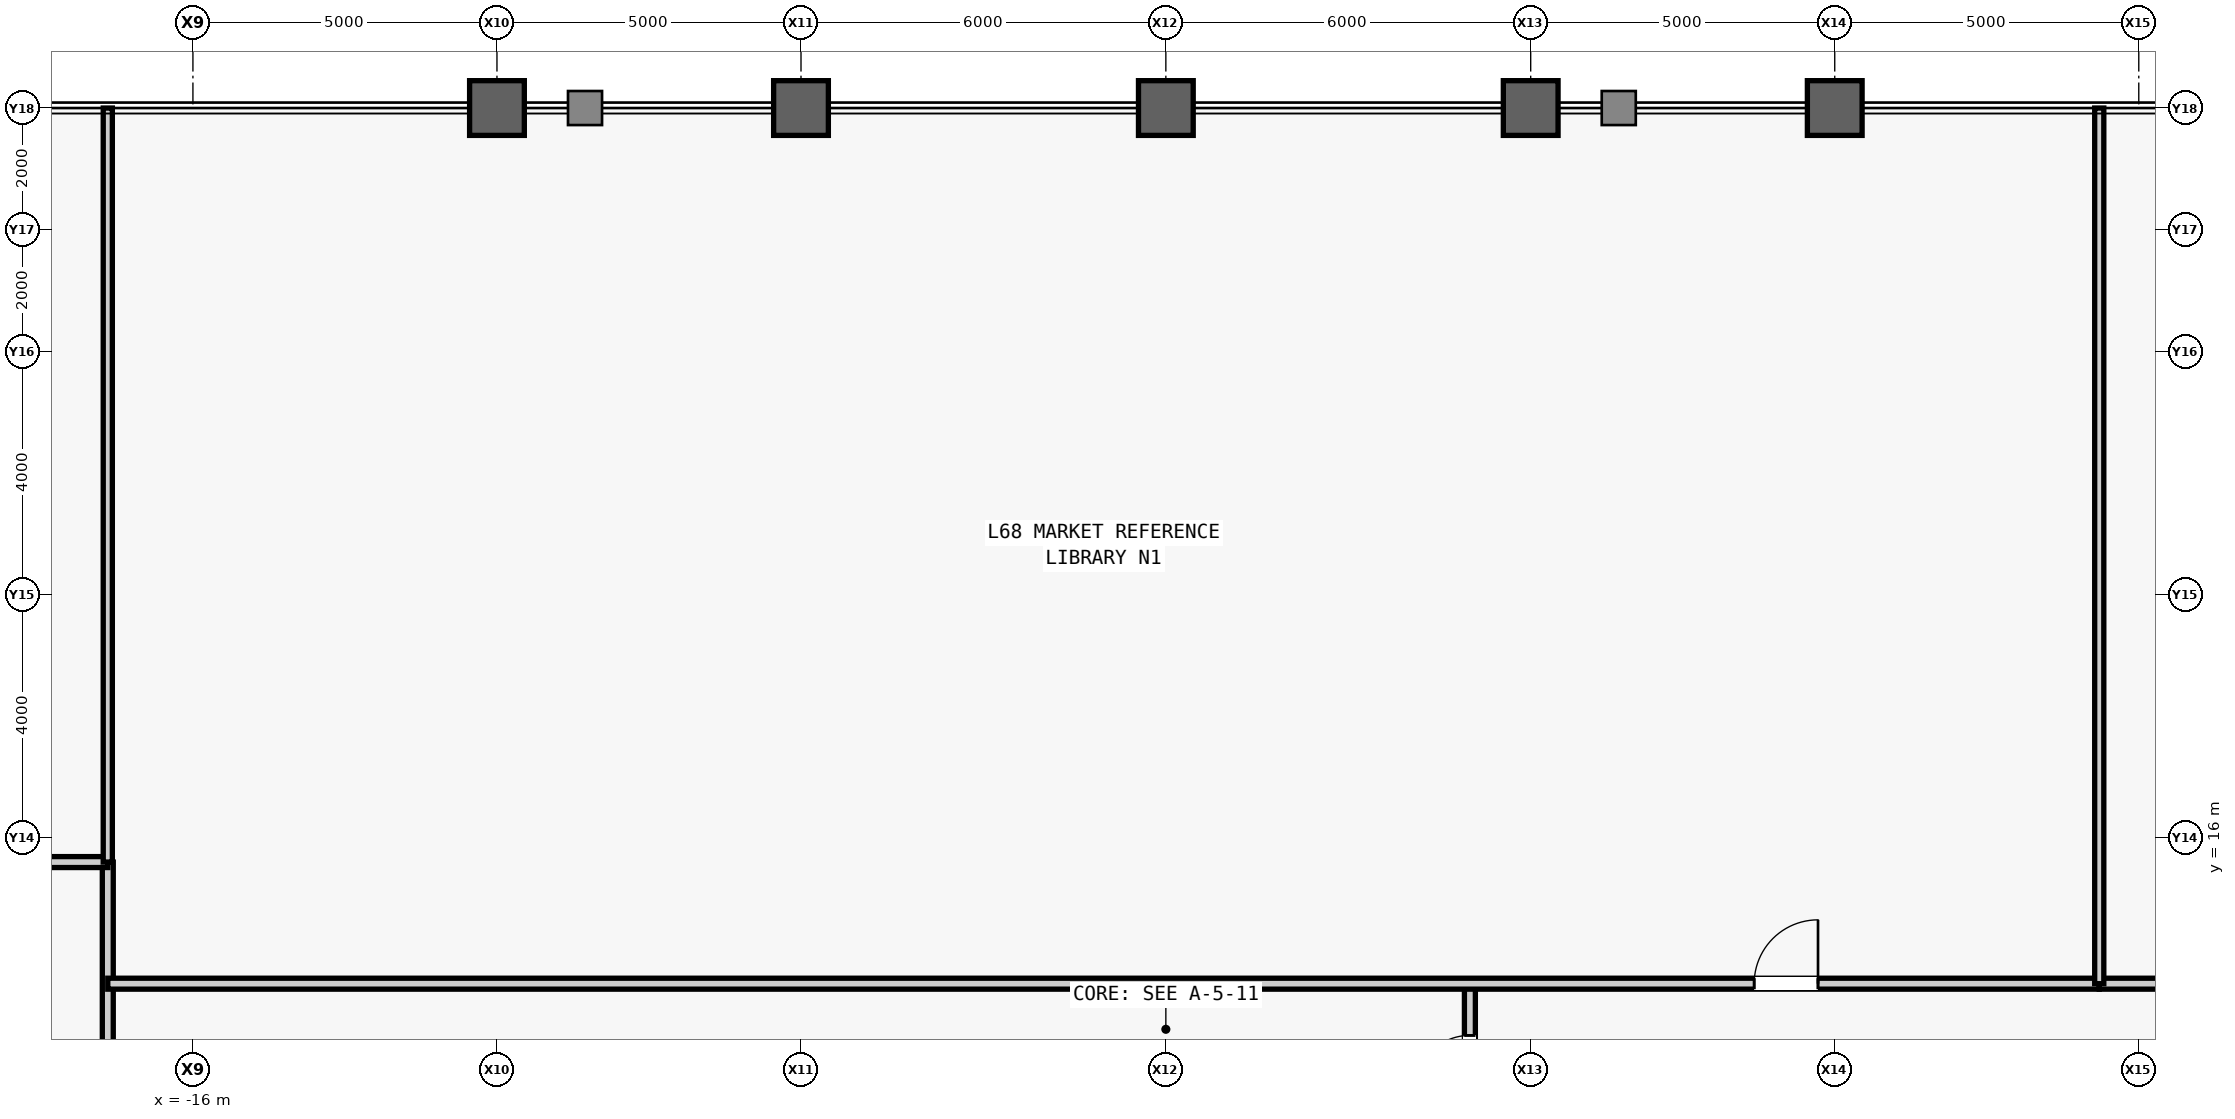
"""IFC4 building model, lengths in metres.
Left out: names, types, materials, properties, quantities, classifications, styles, units other than length and angle.
Written with IfcOpenShell. Run it as: python <this file> out.ifc"""

import sys

from ifc_helpers import new_model, si_unit, direction, frame, frame_2d, origin, origin_2d, place, context, subcontext, project, spatial, rectangle, hollow_rectangle, extrude, source, transform, mapped, element, fill, save


model = new_model("IFC4")
c1 = context("Model", 3, precision=1e-05, world=origin(), true_north=direction((0.0, 1.0)))
c2 = subcontext(c1, "Body", "Model", "MODEL_VIEW")
j1 = project(units=[si_unit("LENGTHUNIT", "METRE"), si_unit("PLANEANGLEUNIT", "RADIAN")], contexts=[c1])
p1 = place(None, origin())
s1 = spatial("IfcSite", under=j1, at=p1, CompositionType="ELEMENT")
p2 = place(p1, origin())
s2 = spatial("IfcBuilding", under=s1, at=p2, CompositionType="ELEMENT")
p3 = place(p2, frame((0.0, 0.0, 289.5)))
s3 = spatial("IfcBuildingStorey", under=s2, at=p3, CompositionType="ELEMENT", Elevation=289.5)
m1 = source(origin(), c2, "Body", "SweptSolid", [
    extrude(hollow_rectangle(XDim=0.9, YDim=0.9, WallThickness=0.05, at=origin_2d()), origin(), (0.0, 0.0, 1.0), 4.0),
])
for number, where, z_axis, x_axis in (
    (1, (-11.0, 28.0, 0.0), (0.0, 0.0, 1.0), (1.0, 0.0, 0.0)),
    (2, (-6.0, 28.0, 0.0), (0.0, 0.0, 1.0), (1.0, 0.0, 0.0)),
    (3, (0.0, 28.0, 0.0), (0.0, 0.0, 1.0), (1.0, 0.0, 0.0)),
    (4, (6.0, 28.0, 0.0), (0.0, 0.0, 1.0), (1.0, 0.0, 0.0)),
    (5, (11.0, 28.0, 0.0), (0.0, 0.0, 1.0), (1.0, 0.0, 0.0)),
):
    element("IfcColumn", number, at=place(p3, frame(where, z_axis=z_axis, x_axis=x_axis)), inside=s3, PredefinedType="COLUMN", context=c2, shape_type="MappedRepresentation", body=[
        mapped(m1, transform((0.0, 0.0, 0.0), scale=1.0)),
    ])
m2 = source(origin(), c2, "Body", "SweptSolid", [
    extrude(rectangle(XDim=8.4, YDim=0.18, at=frame_2d((4.2, 0.0))), origin(), (0.0, 0.0, 1.0), 3.78),
])
p4 = place(p3, frame((-17.4, 7.2, 0.0), z_axis=(0.0, 0.0, 1.0), x_axis=(0.0, 1.0, 0.0)))
e6 = element("IfcWall", 6, at=p4, inside=s3, PredefinedType="PARTITIONING", context=c2, shape_type="MappedRepresentation", body=[
    mapped(m2, transform((0.0, 0.0, 0.0), scale=1.0)),
])
m3 = source(origin(), c2, "Body", "SweptSolid", [
    extrude(rectangle(XDim=2.6, YDim=0.18, at=frame_2d((1.3, 0.0))), origin(), (0.0, 0.0, 1.0), 3.78),
])
p5 = place(p3, frame((5.0, 11.0, 0.0), z_axis=(0.0, 0.0, 1.0), x_axis=(0.0, 1.0, 0.0)))
e7 = element("IfcWall", 7, at=p5, inside=s3, PredefinedType="PARTITIONING", context=c2, shape_type="MappedRepresentation", body=[
    mapped(m3, transform((0.0, 0.0, 0.0), scale=1.0)),
])
m4 = source(origin(), c2, "Body", "SweptSolid", [
    extrude(rectangle(XDim=0.9, YDim=2.15, at=frame_2d((0.45, 1.075))), frame((0.0, 0.1, 0.0), z_axis=(0.0, -1.0, 0.0), x_axis=(1.0, 0.0, 0.0)), (0.0, 0.0, 1.0), 0.2),
])
p6 = place(p5, frame((0.85, 0.0, 0.0)))
e8 = element("IfcOpeningElement", 8, at=p6, cuts=e7, PredefinedType="OPENING", context=c2, shape_type="MappedRepresentation", body=[
    mapped(m4, transform((0.0, 0.0, 0.0), scale=1.0)),
])
m5 = source(origin(), c2, "Body", "SweptSolid", [
    extrude(rectangle(XDim=2.4, YDim=0.18, at=frame_2d((1.2, 0.0))), origin(), (0.0, 0.0, 1.0), 3.78),
])
p7 = place(p3, frame((-19.8, 15.6, 0.0), z_axis=(0.0, 0.0, 1.0), x_axis=(1.0, 0.0, 0.0)))
e9 = element("IfcWall", 9, at=p7, inside=s3, PredefinedType="PARTITIONING", context=c2, shape_type="MappedRepresentation", body=[
    mapped(m5, transform((0.0, 0.0, 0.0), scale=1.0)),
])
m6 = source(origin(), c2, "Body", "SweptSolid", [
    extrude(rectangle(XDim=2.4, YDim=0.18, at=frame_2d((1.2, 0.0))), origin(), (0.0, 0.0, 1.0), 3.78),
])
p8 = place(p3, frame((15.35, 13.6, 0.0), z_axis=(0.0, 0.0, 1.0), x_axis=(1.0, 0.0, 0.0)))
e10 = element("IfcWall", 10, at=p8, inside=s3, PredefinedType="PARTITIONING", context=c2, shape_type="MappedRepresentation", body=[
    mapped(m6, transform((0.0, 0.0, 0.0), scale=1.0)),
])
m7 = source(origin(), c2, "Body", "SweptSolid", [
    extrude(rectangle(XDim=32.75, YDim=0.18, at=frame_2d((16.375, 0.0))), origin(), (0.0, 0.0, 1.0), 3.78),
])
p9 = place(p3, frame((-17.4, 13.6, 0.0), z_axis=(0.0, 0.0, 1.0), x_axis=(1.0, 0.0, 0.0)))
e11 = element("IfcWall", 11, at=p9, inside=s3, PredefinedType="PARTITIONING", context=c2, shape_type="MappedRepresentation", body=[
    mapped(m7, transform((0.0, 0.0, 0.0), scale=1.0)),
])
m8 = source(origin(), c2, "Body", "SweptSolid", [
    extrude(rectangle(XDim=1.05, YDim=2.2, at=frame_2d((0.525, 1.1))), frame((0.0, 0.1, 0.0), z_axis=(0.0, -1.0, 0.0), x_axis=(1.0, 0.0, 0.0)), (0.0, 0.0, 1.0), 0.2),
])
p10 = place(p9, frame((27.075, 0.0, 0.0)))
e12 = element("IfcOpeningElement", 12, at=p10, cuts=e11, PredefinedType="OPENING", context=c2, shape_type="MappedRepresentation", body=[
    mapped(m8, transform((0.0, 0.0, 0.0), scale=1.0)),
])
m9 = source(origin(), c2, "Body", "SweptSolid", [
    extrude(rectangle(XDim=12.4, YDim=0.15, at=frame_2d((6.2, 0.0))), origin(), (0.0, 0.0, 1.0), 3.78),
])
p11 = place(p3, frame((-17.4, 15.6, 0.0), z_axis=(0.0, 0.0, 1.0), x_axis=(0.0, 1.0, 0.0)))
e13 = element("IfcWall", 13, at=p11, inside=s3, PredefinedType="PARTITIONING", context=c2, shape_type="MappedRepresentation", body=[
    mapped(m9, transform((0.0, 0.0, 0.0), scale=1.0)),
])
m10 = source(origin(), c2, "Body", "SweptSolid", [
    extrude(rectangle(XDim=14.4, YDim=0.15, at=frame_2d((7.2, 0.0))), origin(), (0.0, 0.0, 1.0), 3.78),
])
p12 = place(p3, frame((15.35, 13.6, 0.0), z_axis=(0.0, 0.0, 1.0), x_axis=(0.0, 1.0, 0.0)))
e14 = element("IfcWall", 14, at=p12, inside=s3, PredefinedType="PARTITIONING", context=c2, shape_type="MappedRepresentation", body=[
    mapped(m10, transform((0.0, 0.0, 0.0), scale=1.0)),
])
m11 = source(origin(), c2, "Body", "SweptSolid", [
    extrude(rectangle(XDim=0.9, YDim=2.15, at=frame_2d((0.45, 1.075))), frame((0.0, 0.025, 0.0), z_axis=(0.0, -1.0, 0.0), x_axis=(1.0, 0.0, 0.0)), (0.0, 0.0, 1.0), 0.05),
])
p13 = place(p6, origin())
e15 = element("IfcDoor", 15, at=p13, inside=s3, OperationType="SINGLE_SWING_LEFT", PredefinedType="DOOR", context=c2, shape_type="MappedRepresentation", body=[
    mapped(m11, transform((0.0, 0.0, 0.0), scale=1.0)),
])
fill(e8, e15)
m12 = source(origin(), c2, "Body", "SweptSolid", [
    extrude(rectangle(XDim=1.05, YDim=2.2, at=frame_2d((0.525, 1.1))), frame((0.0, 0.025, 0.0), z_axis=(0.0, -1.0, 0.0), x_axis=(1.0, 0.0, 0.0)), (0.0, 0.0, 1.0), 0.05),
])
p14 = place(p10, origin())
e16 = element("IfcDoor", 16, at=p14, inside=s3, OperationType="SINGLE_SWING_RIGHT", PredefinedType="DOOR", context=c2, shape_type="MappedRepresentation", body=[
    mapped(m12, transform((0.0, 0.0, 0.0), scale=1.0)),
])
fill(e12, e16)
save(model, sys.argv[1])
